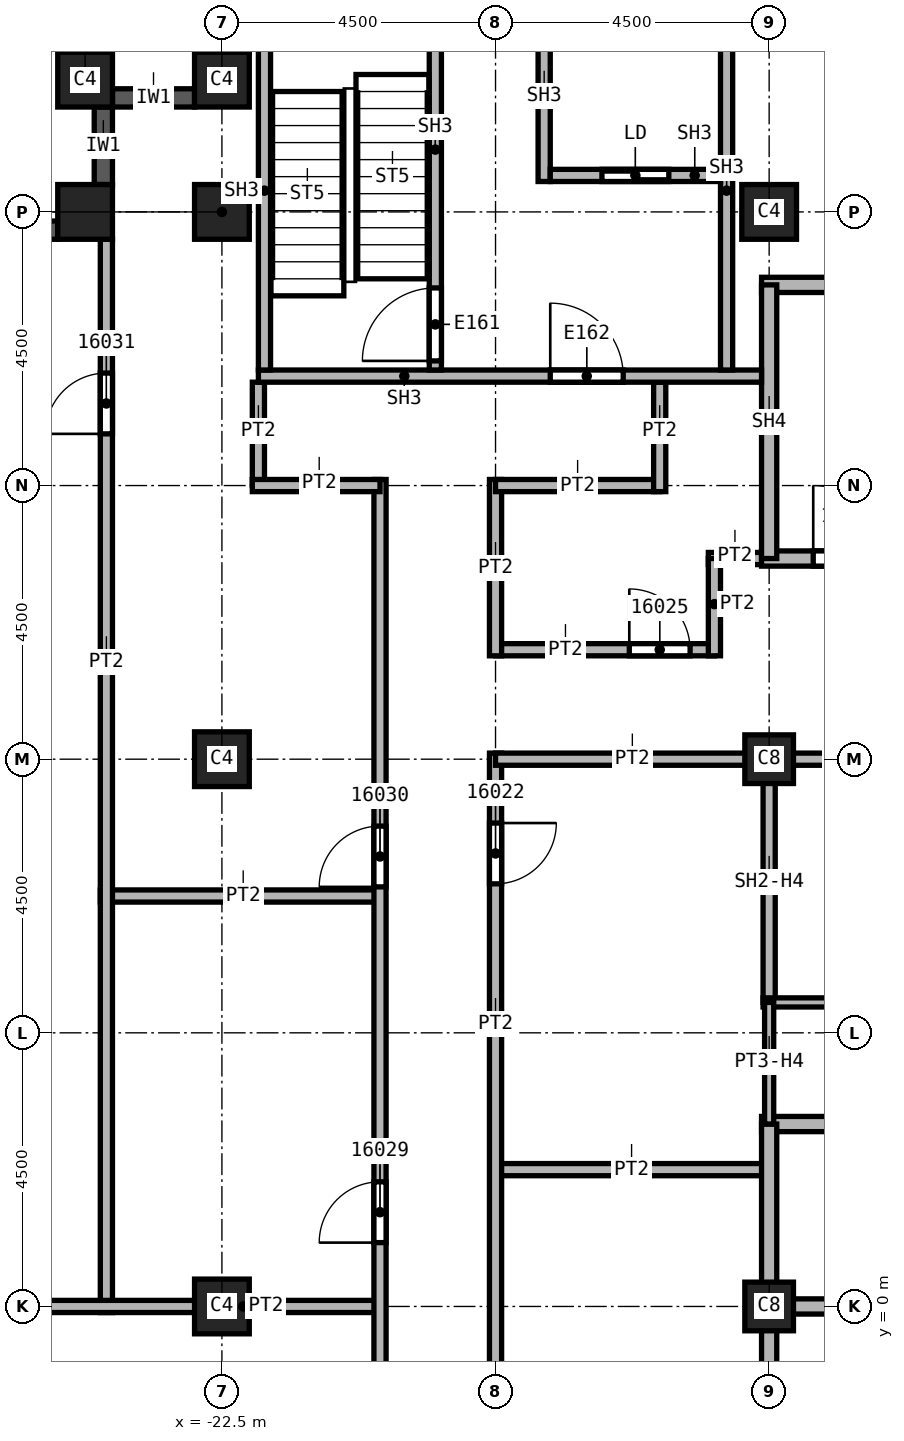
"""IFC4 building model, lengths in metres.
Left out: names, types, materials, properties, quantities, classifications, styles, units other than length and angle.
Written with IfcOpenShell. Run it as: python <this file> out.ifc"""

import sys

from ifc_helpers import new_model, si_unit, direction, frame, frame_2d, origin, origin_2d, place, context, subcontext, project, spatial, rectangle, extrude, element, fill, save


model = new_model("IFC4")
c1 = context("Model", 3, precision=1e-05, world=origin(), true_north=direction((0.0, 1.0)))
c2 = subcontext(c1, "Body", "Model", "MODEL_VIEW")
j1 = project(units=[si_unit("LENGTHUNIT", "METRE"), si_unit("PLANEANGLEUNIT", "RADIAN")], contexts=[c1])
p1 = place(None, origin())
s1 = spatial("IfcSite", under=j1, at=p1, CompositionType="ELEMENT")
p2 = place(p1, origin())
s2 = spatial("IfcBuilding", under=s1, at=p2, CompositionType="ELEMENT")
p3 = place(p2, frame((0.0, 0.0, 246.0)))
s3 = spatial("IfcBuildingStorey", under=s2, at=p3, CompositionType="ELEMENT", Elevation=246.0)
for number, where, z_axis, x_axis in (
    (1, (-13.5, 18.0, 0.0), (0.0, 0.0, 1.0), (1.0, 0.0, 0.0)),
    (2, (-22.5, 0.0, 0.0), (0.0, 0.0, 1.0), (1.0, 0.0, 0.0)),
    (3, (-22.5, 9.0, 0.0), (0.0, 0.0, 1.0), (1.0, 0.0, 0.0)),
    (4, (-22.5, 18.0, 0.0), (0.0, 0.0, 1.0), (1.0, 0.0, 0.0)),
):
    element("IfcColumn", number, at=place(p3, frame(where, z_axis=z_axis, x_axis=x_axis)), inside=s3, PredefinedType="COLUMN", context=c2, shape_type="SweptSolid", body=[
        extrude(rectangle(XDim=0.9, YDim=0.9, at=origin_2d()), origin(), (0.0, 0.0, 1.0), 3.72),
    ])
for number, where, z_axis, x_axis in (
    (5, (-13.5, 0.0, 0.0), (0.0, 0.0, 1.0), (1.0, 0.0, 0.0)),
    (6, (-13.5, 9.0, 0.0), (0.0, 0.0, 1.0), (1.0, 0.0, 0.0)),
):
    element("IfcColumn", number, at=place(p3, frame(where, z_axis=z_axis, x_axis=x_axis)), inside=s3, PredefinedType="COLUMN", context=c2, shape_type="SweptSolid", body=[
        extrude(rectangle(XDim=0.8, YDim=0.8, at=origin_2d()), origin(), (0.0, 0.0, 1.0), 3.72),
    ])
for number, where, z_axis, x_axis in (
    (7, (-22.5, 20.175, 0.0), (0.0, 0.0, 1.0), (1.0, 0.0, 0.0)),
    (8, (-24.75, 20.175, 0.0), (0.0, 0.0, 1.0), (1.0, 0.0, 0.0)),
    (9, (-24.75, 18.0, 0.0), (0.0, 0.0, 1.0), (1.0, 0.0, 0.0)),
):
    element("IfcColumn", number, at=place(p3, frame(where, z_axis=z_axis, x_axis=x_axis)), inside=s3, PredefinedType="COLUMN", context=c2, shape_type="SweptSolid", body=[
        extrude(rectangle(XDim=0.9, YDim=0.9, at=origin_2d()), origin(), (0.0, 0.0, 1.0), 3.72),
    ])
p4 = place(p3, frame((-24.45, 19.725, 0.0), z_axis=(0.0, 0.0, 1.0), x_axis=(0.0, -1.0, 0.0)))
e10 = element("IfcWall", 10, at=p4, inside=s3, PredefinedType="SOLIDWALL", context=c2, shape_type="SweptSolid", body=[
    extrude(rectangle(XDim=1.275, YDim=0.3, at=frame_2d((0.638, 0.0))), origin(), (0.0, 0.0, 1.0), 3.12),
])
for number, where, z_axis, x_axis in (
    (11, (-25.2, 17.7, 0.0), (0.0, 0.0, 1.0), (-1.0, 0.0, 0.0)),
    (12, (-22.95, 19.875, 0.0), (0.0, 0.0, 1.0), (-1.0, 0.0, 0.0)),
):
    element("IfcWall", number, at=place(p3, frame(where, z_axis=z_axis, x_axis=x_axis)), inside=s3, PredefinedType="SOLIDWALL", context=c2, shape_type="SweptSolid", body=[
        extrude(rectangle(XDim=1.35, YDim=0.3, at=frame_2d((0.675, 0.0))), origin(), (0.0, 0.0, 1.0), 3.12),
    ])
p5 = place(p3, frame((-24.5, 6.75, 0.0), z_axis=(0.0, 0.0, 1.0), x_axis=(1.0, 0.0, 0.0)))
e13 = element("IfcWall", 13, at=p5, inside=s3, PredefinedType="PARTITIONING", context=c2, shape_type="SweptSolid", body=[
    extrude(rectangle(XDim=4.6, YDim=0.2, at=frame_2d((2.3, 0.0))), origin(), (0.0, 0.0, 1.0), 3.72),
])
p6 = place(p3, frame((-24.4, -0.1, 0.0), z_axis=(0.0, 0.0, 1.0), x_axis=(0.0, 1.0, 0.0)))
e14 = element("IfcWall", 14, at=p6, inside=s3, PredefinedType="PARTITIONING", context=c2, shape_type="SweptSolid", body=[
    extrude(rectangle(XDim=17.65, YDim=0.2, at=frame_2d((8.825, 0.0))), origin(), (0.0, 0.0, 1.0), 3.72),
])
p7 = place(p6, frame((14.45, 0.0, 0.0)))
e15 = element("IfcOpeningElement", 15, at=p7, cuts=e14, PredefinedType="OPENING", context=c2, shape_type="SweptSolid", body=[
    extrude(rectangle(XDim=1.0, YDim=2.1, at=frame_2d((0.5, 1.05))), frame((0.0, 0.1, 0.0), z_axis=(0.0, -1.0, 0.0), x_axis=(1.0, 0.0, 0.0)), (0.0, 0.0, 1.0), 0.2),
])
p8 = place(p3, frame((-19.9, 0.0, 0.0), z_axis=(0.0, 0.0, 1.0), x_axis=(-1.0, 0.0, 0.0)))
e16 = element("IfcWall", 16, at=p8, inside=s3, PredefinedType="PARTITIONING", context=c2, shape_type="SweptSolid", body=[
    extrude(rectangle(XDim=6.65, YDim=0.2, at=frame_2d((3.325, 0.0))), origin(), (0.0, 0.0, 1.0), 3.72),
])
p9 = place(p3, frame((-21.9, 13.5, 0.0), z_axis=(0.0, 0.0, 1.0), x_axis=(0.0, 1.0, 0.0)))
e17 = element("IfcWall", 17, at=p9, inside=s3, PredefinedType="PARTITIONING", context=c2, shape_type="SweptSolid", body=[
    extrude(rectangle(XDim=1.7, YDim=0.2, at=frame_2d((0.85, 0.0))), origin(), (0.0, 0.0, 1.0), 3.72),
])
p10 = place(p3, frame((-19.9, -21.9, 0.0), z_axis=(0.0, 0.0, 1.0), x_axis=(0.0, 1.0, 0.0)))
e18 = element("IfcWall", 18, at=p10, inside=s3, PredefinedType="PARTITIONING", context=c2, shape_type="SweptSolid", body=[
    extrude(rectangle(XDim=35.5, YDim=0.2, at=frame_2d((17.75, 0.0))), origin(), (0.0, 0.0, 1.0), 3.72),
])
p11 = place(p10, frame((22.95, 0.0, 0.0)))
e19 = element("IfcOpeningElement", 19, at=p11, cuts=e18, PredefinedType="OPENING", context=c2, shape_type="SweptSolid", body=[
    extrude(rectangle(XDim=1.0, YDim=2.1, at=frame_2d((0.5, 1.05))), frame((0.0, 0.1, 0.0), z_axis=(0.0, -1.0, 0.0), x_axis=(1.0, 0.0, 0.0)), (0.0, 0.0, 1.0), 0.2),
])
p12 = place(p10, frame((28.8, 0.0, 0.0)))
e20 = element("IfcOpeningElement", 20, at=p12, cuts=e18, PredefinedType="OPENING", context=c2, shape_type="SweptSolid", body=[
    extrude(rectangle(XDim=1.0, YDim=2.1, at=frame_2d((0.5, 1.05))), frame((0.0, 0.1, 0.0), z_axis=(0.0, -1.0, 0.0), x_axis=(1.0, 0.0, 0.0)), (0.0, 0.0, 1.0), 0.2),
])
p13 = place(p10, frame((7.75, 0.0, 0.0)))
e21 = element("IfcOpeningElement", 21, at=p13, cuts=e18, PredefinedType="OPENING", context=c2, shape_type="SweptSolid", body=[
    extrude(rectangle(XDim=1.0, YDim=2.1, at=frame_2d((0.5, 1.05))), frame((0.0, 0.1, 0.0), z_axis=(0.0, -1.0, 0.0), x_axis=(1.0, 0.0, 0.0)), (0.0, 0.0, 1.0), 0.2),
])
p14 = place(p10, frame((17.85, 0.0, 0.0)))
e22 = element("IfcOpeningElement", 22, at=p14, cuts=e18, PredefinedType="OPENING", context=c2, shape_type="SweptSolid", body=[
    extrude(rectangle(XDim=1.0, YDim=2.1, at=frame_2d((0.5, 1.05))), frame((0.0, 0.1, 0.0), z_axis=(0.0, -1.0, 0.0), x_axis=(1.0, 0.0, 0.0)), (0.0, 0.0, 1.0), 0.2),
])
p15 = place(p3, frame((-19.9, 13.5, 0.0), z_axis=(0.0, 0.0, 1.0), x_axis=(-1.0, 0.0, 0.0)))
e23 = element("IfcWall", 23, at=p15, inside=s3, PredefinedType="PARTITIONING", context=c2, shape_type="SweptSolid", body=[
    extrude(rectangle(XDim=2.1, YDim=0.2, at=frame_2d((1.05, 0.0))), origin(), (0.0, 0.0, 1.0), 3.72),
])
p16 = place(p3, frame((-18.0, 2.25, 0.0), z_axis=(0.0, 0.0, 1.0), x_axis=(1.0, 0.0, 0.0)))
e24 = element("IfcWall", 24, at=p16, inside=s3, PredefinedType="PARTITIONING", context=c2, shape_type="SweptSolid", body=[
    extrude(rectangle(XDim=4.5, YDim=0.2, at=frame_2d((2.25, 0.0))), origin(), (0.0, 0.0, 1.0), 3.72),
])
p17 = place(p3, frame((-18.0, 9.1, 0.0), z_axis=(0.0, 0.0, 1.0), x_axis=(0.0, -1.0, 0.0)))
e25 = element("IfcWall", 25, at=p17, inside=s3, PredefinedType="PARTITIONING", context=c2, shape_type="SweptSolid", body=[
    extrude(rectangle(XDim=18.2, YDim=0.2, at=frame_2d((9.1, 0.0))), origin(), (0.0, 0.0, 1.0), 3.72),
])
p18 = place(p17, frame((11.05, 0.0, 0.0)))
e26 = element("IfcOpeningElement", 26, at=p18, cuts=e25, PredefinedType="OPENING", context=c2, shape_type="SweptSolid", body=[
    extrude(rectangle(XDim=1.0, YDim=2.1, at=frame_2d((0.5, 1.05))), frame((0.0, 0.1, 0.0), z_axis=(0.0, -1.0, 0.0), x_axis=(1.0, 0.0, 0.0)), (0.0, 0.0, 1.0), 0.2),
])
p19 = place(p17, frame((1.15, 0.0, 0.0)))
e27 = element("IfcOpeningElement", 27, at=p19, cuts=e25, PredefinedType="OPENING", context=c2, shape_type="SweptSolid", body=[
    extrude(rectangle(XDim=1.0, YDim=2.1, at=frame_2d((0.5, 1.05))), frame((0.0, 0.1, 0.0), z_axis=(0.0, -1.0, 0.0), x_axis=(1.0, 0.0, 0.0)), (0.0, 0.0, 1.0), 0.2),
])
p20 = place(p3, frame((-18.0, 10.8, 0.0), z_axis=(0.0, 0.0, 1.0), x_axis=(1.0, 0.0, 0.0)))
e28 = element("IfcWall", 28, at=p20, inside=s3, PredefinedType="PARTITIONING", context=c2, shape_type="SweptSolid", body=[
    extrude(rectangle(XDim=3.6, YDim=0.2, at=frame_2d((1.8, 0.0))), origin(), (0.0, 0.0, 1.0), 3.72),
])
p21 = place(p20, frame((2.2, 0.0, 0.0)))
e29 = element("IfcOpeningElement", 29, at=p21, cuts=e28, PredefinedType="OPENING", context=c2, shape_type="SweptSolid", body=[
    extrude(rectangle(XDim=1.0, YDim=2.1, at=frame_2d((0.5, 1.05))), frame((0.0, 0.1, 0.0), z_axis=(0.0, -1.0, 0.0), x_axis=(1.0, 0.0, 0.0)), (0.0, 0.0, 1.0), 0.2),
])
p22 = place(p3, frame((-18.0, 13.6, 0.0), z_axis=(0.0, 0.0, 1.0), x_axis=(0.0, -1.0, 0.0)))
e30 = element("IfcWall", 30, at=p22, inside=s3, PredefinedType="PARTITIONING", context=c2, shape_type="SweptSolid", body=[
    extrude(rectangle(XDim=2.9, YDim=0.2, at=frame_2d((1.45, 0.0))), origin(), (0.0, 0.0, 1.0), 3.72),
])
p23 = place(p3, frame((-15.3, 13.5, 0.0), z_axis=(0.0, 0.0, 1.0), x_axis=(-1.0, 0.0, 0.0)))
e31 = element("IfcWall", 31, at=p23, inside=s3, PredefinedType="PARTITIONING", context=c2, shape_type="SweptSolid", body=[
    extrude(rectangle(XDim=2.7, YDim=0.2, at=frame_2d((1.35, 0.0))), origin(), (0.0, 0.0, 1.0), 3.72),
])
p24 = place(p3, frame((-15.3, 15.2, 0.0), z_axis=(0.0, 0.0, 1.0), x_axis=(0.0, -1.0, 0.0)))
e32 = element("IfcWall", 32, at=p24, inside=s3, PredefinedType="PARTITIONING", context=c2, shape_type="SweptSolid", body=[
    extrude(rectangle(XDim=1.8, YDim=0.2, at=frame_2d((0.9, 0.0))), origin(), (0.0, 0.0, 1.0), 3.72),
])
p25 = place(p3, frame((-14.5, 12.3, 0.0), z_axis=(0.0, 0.0, 1.0), x_axis=(1.0, 0.0, 0.0)))
e33 = element("IfcWall", 33, at=p25, inside=s3, PredefinedType="PARTITIONING", context=c2, shape_type="SweptSolid", body=[
    extrude(rectangle(XDim=1.125, YDim=0.2, at=frame_2d((0.562, 0.0))), origin(), (0.0, 0.0, 1.0), 3.72),
])
p26 = place(p3, frame((-13.5, 9.0, 0.0), z_axis=(0.0, 0.0, 1.0), x_axis=(-1.0, 0.0, 0.0)))
e34 = element("IfcWall", 34, at=p26, inside=s3, PredefinedType="PARTITIONING", context=c2, shape_type="SweptSolid", body=[
    extrude(rectangle(XDim=4.5, YDim=0.2, at=frame_2d((2.25, 0.0))), origin(), (0.0, 0.0, 1.0), 3.72),
])
p27 = place(p3, frame((-14.4, 10.7, 0.0), z_axis=(0.0, 0.0, 1.0), x_axis=(0.0, 1.0, 0.0)))
e35 = element("IfcWall", 35, at=p27, inside=s3, PredefinedType="PARTITIONING", context=c2, shape_type="SweptSolid", body=[
    extrude(rectangle(XDim=1.6, YDim=0.2, at=frame_2d((0.8, 0.0))), origin(), (0.0, 0.0, 1.0), 3.72),
])
p28 = place(p3, frame((-13.6, 9.0, 0.0), z_axis=(0.0, 0.0, 1.0), x_axis=(1.0, 0.0, 0.0)))
e36 = element("IfcWall", 36, at=p28, inside=s3, PredefinedType="SOLIDWALL", context=c2, shape_type="SweptSolid", body=[
    extrude(rectangle(XDim=3.1, YDim=0.2, at=frame_2d((1.55, 0.0))), origin(), (0.0, 0.0, 1.0), 3.042),
])
p29 = place(p3, frame((-13.5, 5.0, 0.0), z_axis=(0.0, 0.0, 1.0), x_axis=(0.0, 1.0, 0.0)))
e37 = element("IfcWall", 37, at=p29, inside=s3, PredefinedType="SOLIDWALL", context=c2, shape_type="SweptSolid", body=[
    extrude(rectangle(XDim=4.1, YDim=0.2, at=frame_2d((2.05, 0.0))), origin(), (0.0, 0.0, 1.0), 3.042),
])
p30 = place(p3, frame((-13.625, 0.0, 0.0), z_axis=(0.0, 0.0, 1.0), x_axis=(1.0, 0.0, 0.0)))
e38 = element("IfcWall", 38, at=p30, inside=s3, PredefinedType="SOLIDWALL", context=c2, shape_type="SweptSolid", body=[
    extrude(rectangle(XDim=3.125, YDim=0.25, at=frame_2d((1.562, 0.0))), origin(), (0.0, 0.0, 1.0), 3.72),
])
p31 = place(p3, frame((-13.625, 3.0, 0.0), z_axis=(0.0, 0.0, 1.0), x_axis=(1.0, 0.0, 0.0)))
e39 = element("IfcWall", 39, at=p31, inside=s3, PredefinedType="SOLIDWALL", context=c2, shape_type="SweptSolid", body=[
    extrude(rectangle(XDim=9.25, YDim=0.25, at=frame_2d((4.625, 0.0))), origin(), (0.0, 0.0, 1.0), 3.72),
])
p32 = place(p31, frame((3.25, 0.0, 0.0)))
e40 = element("IfcOpeningElement", 40, at=p32, cuts=e39, PredefinedType="OPENING", context=c2, shape_type="SweptSolid", body=[
    extrude(rectangle(XDim=1.1, YDim=2.1, at=frame_2d((0.55, 1.05))), frame((0.0, 0.125, 0.0), z_axis=(0.0, -1.0, 0.0), x_axis=(1.0, 0.0, 0.0)), (0.0, 0.0, 1.0), 0.25),
])
p33 = place(p3, frame((-13.5, -3.0, 0.0), z_axis=(0.0, 0.0, 1.0), x_axis=(0.0, 1.0, 0.0)))
e41 = element("IfcWall", 41, at=p33, inside=s3, PredefinedType="SOLIDWALL", context=c2, shape_type="SweptSolid", body=[
    extrude(rectangle(XDim=6.0, YDim=0.25, at=frame_2d((3.0, 0.0))), origin(), (0.0, 0.0, 1.0), 3.042),
])
p34 = place(p3, frame((-13.625, 12.3, 0.0), z_axis=(0.0, 0.0, 1.0), x_axis=(1.0, 0.0, 0.0)))
e42 = element("IfcWall", 42, at=p34, inside=s3, PredefinedType="SOLIDWALL", context=c2, shape_type="SweptSolid", body=[
    extrude(rectangle(XDim=9.25, YDim=0.25, at=frame_2d((4.625, 0.0))), origin(), (0.0, 0.0, 1.0), 3.72),
])
p35 = place(p34, frame((0.85, 0.0, 0.0)))
e43 = element("IfcOpeningElement", 43, at=p35, cuts=e42, PredefinedType="OPENING", context=c2, shape_type="SweptSolid", body=[
    extrude(rectangle(XDim=1.2, YDim=2.1, at=frame_2d((0.6, 1.05))), frame((0.0, 0.125, 0.0), z_axis=(0.0, -1.0, 0.0), x_axis=(1.0, 0.0, 0.0)), (0.0, 0.0, 1.0), 0.25),
])
p36 = place(p3, frame((-13.625, 16.8, 0.0), z_axis=(0.0, 0.0, 1.0), x_axis=(1.0, 0.0, 0.0)))
e44 = element("IfcWall", 44, at=p36, inside=s3, PredefinedType="SOLIDWALL", context=c2, shape_type="SweptSolid", body=[
    extrude(rectangle(XDim=9.25, YDim=0.25, at=frame_2d((4.625, 0.0))), origin(), (0.0, 0.0, 1.0), 3.72),
])
p37 = place(p3, frame((-13.5, 12.3, 0.0), z_axis=(0.0, 0.0, 1.0), x_axis=(0.0, 1.0, 0.0)))
e45 = element("IfcWall", 45, at=p37, inside=s3, PredefinedType="SOLIDWALL", context=c2, shape_type="SweptSolid", body=[
    extrude(rectangle(XDim=4.5, YDim=0.25, at=frame_2d((2.25, 0.0))), origin(), (0.0, 0.0, 1.0), 3.72),
])
p38 = place(p3, frame((-13.6, 5.0, 0.0), z_axis=(0.0, 0.0, 1.0), x_axis=(1.0, 0.0, 0.0)))
e46 = element("IfcWall", 46, at=p38, inside=s3, PredefinedType="PARTITIONING", context=c2, shape_type="SweptSolid", body=[
    extrude(rectangle(XDim=3.1, YDim=0.15, at=frame_2d((1.55, 0.0))), origin(), (0.0, 0.0, 1.0), 3.72),
])
p39 = place(p3, frame((-13.5, 3.0, 0.0), z_axis=(0.0, 0.0, 1.0), x_axis=(0.0, 1.0, 0.0)))
e47 = element("IfcWall", 47, at=p39, inside=s3, PredefinedType="PARTITIONING", context=c2, shape_type="SweptSolid", body=[
    extrude(rectangle(XDim=2.0, YDim=0.15, at=frame_2d((1.0, 0.0))), origin(), (0.0, 0.0, 1.0), 3.042),
])
p40 = place(p3, frame((-21.9, 15.3, 0.0), z_axis=(0.0, 0.0, 1.0), x_axis=(1.0, 0.0, 0.0)))
e48 = element("IfcWall", 48, at=p40, inside=s3, PredefinedType="SOLIDWALL", context=c2, shape_type="SweptSolid", body=[
    extrude(rectangle(XDim=8.275, YDim=0.2, at=frame_2d((4.137, 0.0))), origin(), (0.0, 0.0, 1.0), 3.72),
])
p41 = place(p40, frame((4.8, 0.0, 0.0)))
e49 = element("IfcOpeningElement", 49, at=p41, cuts=e48, PredefinedType="OPENING", context=c2, shape_type="SweptSolid", body=[
    extrude(rectangle(XDim=1.2, YDim=2.1, at=frame_2d((0.6, 1.05))), frame((0.0, 0.1, 0.0), z_axis=(0.0, -1.0, 0.0), x_axis=(1.0, 0.0, 0.0)), (0.0, 0.0, 1.0), 0.2),
])
for number, where, z_axis, x_axis in (
    (50, (-21.8, 15.4, 0.0), (0.0, 0.0, 1.0), (0.0, 1.0, 0.0)),
    (51, (-14.2, 15.4, 0.0), (0.0, 0.0, 1.0), (0.0, 1.0, 0.0)),
):
    element("IfcWall", number, at=place(p3, frame(where, z_axis=z_axis, x_axis=x_axis)), inside=s3, PredefinedType="SOLIDWALL", context=c2, shape_type="SweptSolid", body=[
        extrude(rectangle(XDim=5.9, YDim=0.2, at=frame_2d((2.95, 0.0))), origin(), (0.0, 0.0, 1.0), 3.72),
    ])
p42 = place(p3, frame((-18.99, 15.4, 0.0), z_axis=(0.0, 0.0, 1.0), x_axis=(0.0, 1.0, 0.0)))
e52 = element("IfcWall", 52, at=p42, inside=s3, PredefinedType="SOLIDWALL", context=c2, shape_type="SweptSolid", body=[
    extrude(rectangle(XDim=5.9, YDim=0.2, at=frame_2d((2.95, 0.0))), origin(), (0.0, 0.0, 1.0), 3.72),
])
p43 = place(p42, frame((0.15, 0.0, 0.0)))
e53 = element("IfcOpeningElement", 53, at=p43, cuts=e52, PredefinedType="OPENING", context=c2, shape_type="SweptSolid", body=[
    extrude(rectangle(XDim=1.2, YDim=2.1, at=frame_2d((0.6, 1.05))), frame((0.0, 0.1, 0.0), z_axis=(0.0, -1.0, 0.0), x_axis=(1.0, 0.0, 0.0)), (0.0, 0.0, 1.0), 0.2),
])
p44 = place(p3, frame((-17.2, 18.5, 0.0), z_axis=(0.0, 0.0, 1.0), x_axis=(0.0, 1.0, 0.0)))
e54 = element("IfcWall", 54, at=p44, inside=s3, PredefinedType="SOLIDWALL", context=c2, shape_type="SweptSolid", body=[
    extrude(rectangle(XDim=2.8, YDim=0.2, at=frame_2d((1.4, 0.0))), origin(), (0.0, 0.0, 1.0), 3.72),
])
p45 = place(p3, frame((-17.1, 18.6, 0.0), z_axis=(0.0, 0.0, 1.0), x_axis=(1.0, 0.0, 0.0)))
e55 = element("IfcWall", 55, at=p45, inside=s3, PredefinedType="SOLIDWALL", context=c2, shape_type="SweptSolid", body=[
    extrude(rectangle(XDim=2.8, YDim=0.2, at=frame_2d((1.4, 0.0))), origin(), (0.0, 0.0, 1.0), 3.72),
])
p46 = place(p45, frame((0.85, 0.0, 0.0)))
e56 = element("IfcOpeningElement", 56, at=p46, cuts=e55, PredefinedType="OPENING", context=c2, shape_type="SweptSolid", body=[
    extrude(rectangle(XDim=1.1, YDim=2.1, at=frame_2d((0.55, 1.05))), frame((0.0, 0.1, 0.0), z_axis=(0.0, -1.0, 0.0), x_axis=(1.0, 0.0, 0.0)), (0.0, 0.0, 1.0), 0.2),
])
p47 = place(p35, origin())
e57 = element("IfcDoor", 57, at=p47, inside=s3, OperationType="SINGLE_SWING_RIGHT", PredefinedType="DOOR", context=c2, shape_type="SweptSolid", body=[
    extrude(rectangle(XDim=1.2, YDim=2.1, at=frame_2d((0.6, 1.05))), frame((0.0, 0.025, 0.0), z_axis=(0.0, -1.0, 0.0), x_axis=(1.0, 0.0, 0.0)), (0.0, 0.0, 1.0), 0.05),
])
fill(e43, e57)
p48 = place(p19, origin())
e58 = element("IfcDoor", 58, at=p48, inside=s3, OperationType="SINGLE_SWING_LEFT", PredefinedType="DOOR", context=c2, shape_type="SweptSolid", body=[
    extrude(rectangle(XDim=1.0, YDim=2.1, at=frame_2d((0.5, 1.05))), frame((0.0, 0.025, 0.0), z_axis=(0.0, -1.0, 0.0), x_axis=(1.0, 0.0, 0.0)), (0.0, 0.0, 1.0), 0.05),
])
fill(e27, e58)
p49 = place(p21, origin())
e59 = element("IfcDoor", 59, at=p49, inside=s3, OperationType="SINGLE_SWING_RIGHT", PredefinedType="DOOR", context=c2, shape_type="SweptSolid", body=[
    extrude(rectangle(XDim=1.0, YDim=2.1, at=frame_2d((0.5, 1.05))), frame((0.0, 0.025, 0.0), z_axis=(0.0, -1.0, 0.0), x_axis=(1.0, 0.0, 0.0)), (0.0, 0.0, 1.0), 0.05),
])
fill(e29, e59)
p50 = place(p11, origin())
e60 = element("IfcDoor", 60, at=p50, inside=s3, OperationType="SINGLE_SWING_RIGHT", PredefinedType="DOOR", context=c2, shape_type="SweptSolid", body=[
    extrude(rectangle(XDim=1.0, YDim=2.1, at=frame_2d((0.5, 1.05))), frame((0.0, 0.025, 0.0), z_axis=(0.0, -1.0, 0.0), x_axis=(1.0, 0.0, 0.0)), (0.0, 0.0, 1.0), 0.05),
])
fill(e19, e60)
p51 = place(p12, origin())
e61 = element("IfcDoor", 61, at=p51, inside=s3, OperationType="SINGLE_SWING_LEFT", PredefinedType="DOOR", context=c2, shape_type="SweptSolid", body=[
    extrude(rectangle(XDim=1.0, YDim=2.1, at=frame_2d((0.5, 1.05))), frame((0.0, 0.025, 0.0), z_axis=(0.0, -1.0, 0.0), x_axis=(1.0, 0.0, 0.0)), (0.0, 0.0, 1.0), 0.05),
])
fill(e20, e61)
p52 = place(p7, origin())
e62 = element("IfcDoor", 62, at=p52, inside=s3, OperationType="SINGLE_SWING_RIGHT", PredefinedType="DOOR", context=c2, shape_type="SweptSolid", body=[
    extrude(rectangle(XDim=1.0, YDim=2.1, at=frame_2d((0.5, 1.05))), frame((0.0, 0.025, 0.0), z_axis=(0.0, -1.0, 0.0), x_axis=(1.0, 0.0, 0.0)), (0.0, 0.0, 1.0), 0.05),
])
fill(e15, e62)
p53 = place(p43, origin())
e63 = element("IfcDoor", 63, at=p53, inside=s3, OperationType="SINGLE_SWING_LEFT", PredefinedType="DOOR", context=c2, shape_type="SweptSolid", body=[
    extrude(rectangle(XDim=1.2, YDim=2.1, at=frame_2d((0.6, 1.05))), frame((0.0, 0.025, 0.0), z_axis=(0.0, -1.0, 0.0), x_axis=(1.0, 0.0, 0.0)), (0.0, 0.0, 1.0), 0.05),
])
fill(e53, e63)
p54 = place(p46, origin())
e64 = element("IfcDoor", 64, at=p54, inside=s3, OperationType="SLIDING_TO_LEFT", PredefinedType="DOOR", context=c2, shape_type="SweptSolid", body=[
    extrude(rectangle(XDim=1.1, YDim=2.1, at=frame_2d((0.55, 1.05))), frame((0.0, 0.025, 0.0), z_axis=(0.0, -1.0, 0.0), x_axis=(1.0, 0.0, 0.0)), (0.0, 0.0, 1.0), 0.05),
])
fill(e56, e64)
p55 = place(p41, origin())
e65 = element("IfcDoor", 65, at=p55, inside=s3, OperationType="SINGLE_SWING_RIGHT", PredefinedType="DOOR", context=c2, shape_type="SweptSolid", body=[
    extrude(rectangle(XDim=1.2, YDim=2.1, at=frame_2d((0.6, 1.05))), frame((0.0, 0.025, 0.0), z_axis=(0.0, -1.0, 0.0), x_axis=(1.0, 0.0, 0.0)), (0.0, 0.0, 1.0), 0.05),
])
fill(e49, e65)
save(model, sys.argv[1])
